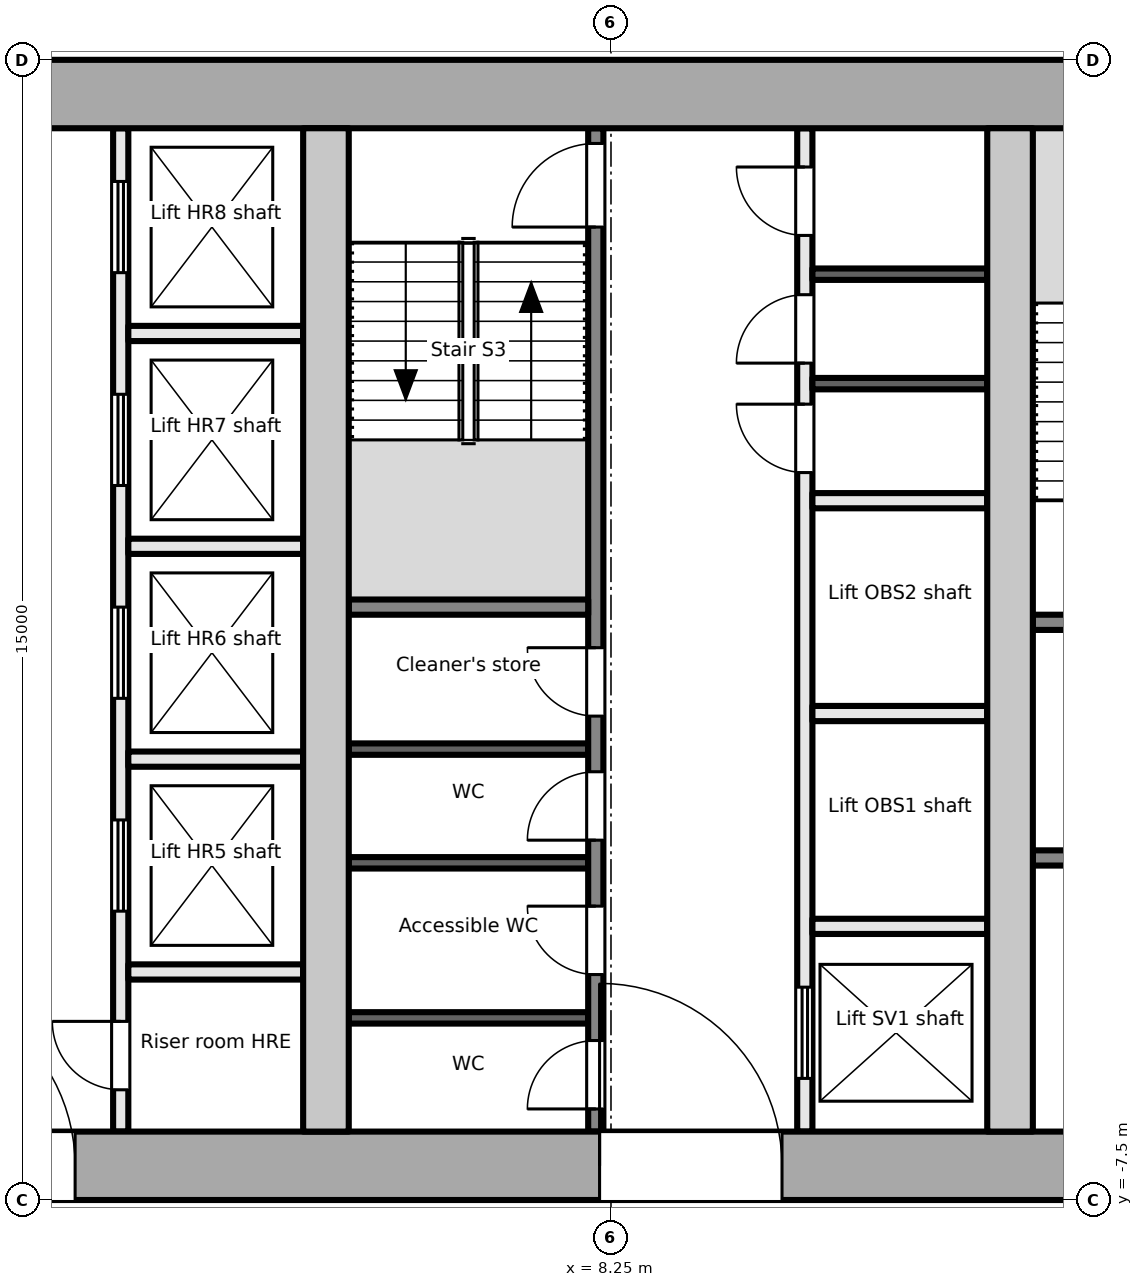
"""IFC4 building model, lengths in metres.
Left out: names, types, materials, properties, quantities, classifications, styles, units other than length and angle.
Written with IfcOpenShell. Run it as: python <this file> out.ifc"""

import sys

from ifc_helpers import new_model, si_unit, direction, frame, frame_2d, origin, place, context, subcontext, project, spatial, rectangle, extrude, element, fill, save


model = new_model("IFC4")
c1 = context("Model", 3, precision=1e-05, world=origin(), true_north=direction((0.0, 1.0)))
c2 = subcontext(c1, "Body", "Model", "MODEL_VIEW")
j1 = project(units=[si_unit("LENGTHUNIT", "METRE"), si_unit("PLANEANGLEUNIT", "RADIAN")], contexts=[c1])
p1 = place(None, origin())
s1 = spatial("IfcSite", under=j1, at=p1, CompositionType="ELEMENT")
p2 = place(p1, origin())
s2 = spatial("IfcBuilding", under=s1, at=p2, CompositionType="ELEMENT")
p3 = place(p2, frame((0.0, 0.0, 270.7)))
s3 = spatial("IfcBuildingStorey", under=s2, at=p3, CompositionType="ELEMENT", Elevation=270.7)
p4 = place(p3, frame((-18.0, -7.05, -0.2), z_axis=(0.0, 0.0, 1.0), x_axis=(1.0, 0.0, 0.0)))
e1 = element("IfcWall", 1, at=p4, inside=s3, PredefinedType="SHEAR", context=c2, shape_type="SweptSolid", body=[
    extrude(rectangle(XDim=36.0, YDim=0.9, at=frame_2d((18.0, 0.0))), origin(), (0.0, 0.0, 1.0), 3.9),
])
p5 = place(p4, frame((11.3, 0.0, 0.2)))
e2 = element("IfcOpeningElement", 2, at=p5, cuts=e1, PredefinedType="OPENING", context=c2, shape_type="SweptSolid", body=[
    extrude(rectangle(XDim=1.8, YDim=2.1, at=frame_2d((0.9, 1.05))), frame((0.0, 0.46, 0.0), z_axis=(0.0, -1.0, 0.0), x_axis=(1.0, 0.0, 0.0)), (0.0, 0.0, 1.0), 0.921),
])
p6 = place(p4, frame((16.8, 0.0, 0.2)))
e3 = element("IfcOpeningElement", 3, at=p6, cuts=e1, PredefinedType="OPENING", context=c2, shape_type="SweptSolid", body=[
    extrude(rectangle(XDim=2.4, YDim=2.1, at=frame_2d((1.2, 1.05))), frame((0.0, 0.46, 0.0), z_axis=(0.0, -1.0, 0.0), x_axis=(1.0, 0.0, 0.0)), (0.0, 0.0, 1.0), 0.921),
])
p7 = place(p4, frame((26.1, 0.0, 0.2)))
e4 = element("IfcOpeningElement", 4, at=p7, cuts=e1, PredefinedType="OPENING", context=c2, shape_type="SweptSolid", body=[
    extrude(rectangle(XDim=2.4, YDim=2.1, at=frame_2d((1.2, 1.05))), frame((0.0, 0.46, 0.0), z_axis=(0.0, -1.0, 0.0), x_axis=(1.0, 0.0, 0.0)), (0.0, 0.0, 1.0), 0.921),
])
p8 = place(p3, frame((-18.0, 7.05, -0.2), z_axis=(0.0, 0.0, 1.0), x_axis=(1.0, 0.0, 0.0)))
e5 = element("IfcWall", 5, at=p8, inside=s3, PredefinedType="SHEAR", context=c2, shape_type="SweptSolid", body=[
    extrude(rectangle(XDim=36.0, YDim=0.9, at=frame_2d((18.0, 0.0))), origin(), (0.0, 0.0, 1.0), 3.9),
])
for number, where, z_axis, x_axis in (
    (6, (4.5, -6.6, -0.2), (0.0, 0.0, 1.0), (0.0, 1.0, 0.0)),
    (7, (13.5, -6.6, -0.2), (0.0, 0.0, 1.0), (0.0, 1.0, 0.0)),
):
    element("IfcWall", number, at=place(p3, frame(where, z_axis=z_axis, x_axis=x_axis)), inside=s3, PredefinedType="SHEAR", context=c2, shape_type="SweptSolid", body=[
        extrude(rectangle(XDim=13.2, YDim=0.6, at=frame_2d((6.6, 0.0))), origin(), (0.0, 0.0, 1.0), 3.9),
    ])
p9 = place(p3, frame((13.8, -3.0, 0.0), z_axis=(0.0, 0.0, 1.0), x_axis=(1.0, 0.0, 0.0)))
e8 = element("IfcWall", 8, at=p9, inside=s3, PredefinedType="PARTITIONING", context=c2, shape_type="SweptSolid", body=[
    extrude(rectangle(XDim=3.3, YDim=0.2, at=frame_2d((1.65, 0.0))), origin(), (0.0, 0.0, 1.0), 3.7),
])
p10 = place(p9, frame((1.1, 0.0, 0.0)))
e9 = element("IfcOpeningElement", 9, at=p10, cuts=e8, PredefinedType="OPENING", context=c2, shape_type="SweptSolid", body=[
    extrude(rectangle(XDim=1.1, YDim=2.1, at=frame_2d((0.55, 1.05))), frame((0.0, 0.111, 0.0), z_axis=(0.0, -1.0, 0.0), x_axis=(1.0, 0.0, 0.0)), (0.0, 0.0, 1.0), 0.221),
])
p11 = place(p3, frame((13.8, 0.1, 0.0), z_axis=(0.0, 0.0, 1.0), x_axis=(1.0, 0.0, 0.0)))
e10 = element("IfcWall", 10, at=p11, inside=s3, PredefinedType="PARTITIONING", context=c2, shape_type="SweptSolid", body=[
    extrude(rectangle(XDim=3.3, YDim=0.2, at=frame_2d((1.65, 0.0))), origin(), (0.0, 0.0, 1.0), 3.7),
])
p12 = place(p11, frame((1.1, 0.0, 0.0)))
e11 = element("IfcOpeningElement", 11, at=p12, cuts=e10, PredefinedType="OPENING", context=c2, shape_type="SweptSolid", body=[
    extrude(rectangle(XDim=1.1, YDim=2.1, at=frame_2d((0.55, 1.05))), frame((0.0, 0.111, 0.0), z_axis=(0.0, -1.0, 0.0), x_axis=(1.0, 0.0, 0.0)), (0.0, 0.0, 1.0), 0.221),
])
p13 = place(p3, frame((1.8, -6.6, 0.0), z_axis=(0.0, 0.0, 1.0), x_axis=(0.0, 1.0, 0.0)))
e12 = element("IfcWall", 12, at=p13, inside=s3, PredefinedType="PARTITIONING", context=c2, shape_type="SweptSolid", body=[
    extrude(rectangle(XDim=13.2, YDim=0.2, at=frame_2d((6.6, 0.0))), origin(), (0.0, 0.0, 1.0), 3.7),
])
p14 = place(p13, frame((0.55, 0.0, 0.0)))
e13 = element("IfcOpeningElement", 13, at=p14, cuts=e12, PredefinedType="OPENING", context=c2, shape_type="SweptSolid", body=[
    extrude(rectangle(XDim=0.9, YDim=2.1, at=frame_2d((0.45, 1.05))), frame((0.0, 0.111, 0.0), z_axis=(0.0, -1.0, 0.0), x_axis=(1.0, 0.0, 0.0)), (0.0, 0.0, 1.0), 0.221),
])
p15 = place(p13, frame((2.9, 0.0, 0.0)))
e14 = element("IfcOpeningElement", 14, at=p15, cuts=e12, PredefinedType="OPENING", context=c2, shape_type="SweptSolid", body=[
    extrude(rectangle(XDim=1.2, YDim=2.1, at=frame_2d((0.6, 1.05))), frame((0.0, 0.111, 0.0), z_axis=(0.0, -1.0, 0.0), x_axis=(1.0, 0.0, 0.0)), (0.0, 0.0, 1.0), 0.221),
])
p16 = place(p13, frame((5.7, 0.0, 0.0)))
e15 = element("IfcOpeningElement", 15, at=p16, cuts=e12, PredefinedType="OPENING", context=c2, shape_type="SweptSolid", body=[
    extrude(rectangle(XDim=1.2, YDim=2.1, at=frame_2d((0.6, 1.05))), frame((0.0, 0.111, 0.0), z_axis=(0.0, -1.0, 0.0), x_axis=(1.0, 0.0, 0.0)), (0.0, 0.0, 1.0), 0.221),
])
p17 = place(p13, frame((8.5, 0.0, 0.0)))
e16 = element("IfcOpeningElement", 16, at=p17, cuts=e12, PredefinedType="OPENING", context=c2, shape_type="SweptSolid", body=[
    extrude(rectangle(XDim=1.2, YDim=2.1, at=frame_2d((0.6, 1.05))), frame((0.0, 0.111, 0.0), z_axis=(0.0, -1.0, 0.0), x_axis=(1.0, 0.0, 0.0)), (0.0, 0.0, 1.0), 0.221),
])
p18 = place(p13, frame((11.3, 0.0, 0.0)))
e17 = element("IfcOpeningElement", 17, at=p18, cuts=e12, PredefinedType="OPENING", context=c2, shape_type="SweptSolid", body=[
    extrude(rectangle(XDim=1.2, YDim=2.1, at=frame_2d((0.6, 1.05))), frame((0.0, 0.111, 0.0), z_axis=(0.0, -1.0, 0.0), x_axis=(1.0, 0.0, 0.0)), (0.0, 0.0, 1.0), 0.221),
])
for number, where, z_axis, x_axis in (
    (18, (1.9, -1.7, 0.0), (0.0, 0.0, 1.0), (1.0, 0.0, 0.0)),
    (19, (1.9, 1.1, 0.0), (0.0, 0.0, 1.0), (1.0, 0.0, 0.0)),
    (20, (1.9, 3.9, 0.0), (0.0, 0.0, 1.0), (1.0, 0.0, 0.0)),
    (21, (1.9, -4.5, 0.0), (0.0, 0.0, 1.0), (1.0, 0.0, 0.0)),
):
    element("IfcWall", number, at=place(p3, frame(where, z_axis=z_axis, x_axis=x_axis)), inside=s3, PredefinedType="PARTITIONING", context=c2, shape_type="SweptSolid", body=[
        extrude(rectangle(XDim=2.3, YDim=0.2, at=frame_2d((1.15, 0.0))), origin(), (0.0, 0.0, 1.0), 3.7),
    ])
p19 = place(p3, frame((8.05, -6.6, 0.0), z_axis=(0.0, 0.0, 1.0), x_axis=(0.0, 1.0, 0.0)))
e22 = element("IfcWall", 22, at=p19, inside=s3, PredefinedType="PARTITIONING", context=c2, shape_type="SweptSolid", body=[
    extrude(rectangle(XDim=13.2, YDim=0.2, at=frame_2d((6.6, 0.0))), origin(), (0.0, 0.0, 1.0), 3.7),
])
p20 = place(p19, frame((0.298, 0.0, 0.0)))
e23 = element("IfcOpeningElement", 23, at=p20, cuts=e22, PredefinedType="OPENING", context=c2, shape_type="SweptSolid", body=[
    extrude(rectangle(XDim=0.9, YDim=2.1, at=frame_2d((0.45, 1.05))), frame((0.0, 0.111, 0.0), z_axis=(0.0, -1.0, 0.0), x_axis=(1.0, 0.0, 0.0)), (0.0, 0.0, 1.0), 0.221),
])
p21 = place(p19, frame((2.066, 0.0, 0.0)))
e24 = element("IfcOpeningElement", 24, at=p21, cuts=e22, PredefinedType="OPENING", context=c2, shape_type="SweptSolid", body=[
    extrude(rectangle(XDim=0.9, YDim=2.1, at=frame_2d((0.45, 1.05))), frame((0.0, 0.111, 0.0), z_axis=(0.0, -1.0, 0.0), x_axis=(1.0, 0.0, 0.0)), (0.0, 0.0, 1.0), 0.221),
])
p22 = place(p19, frame((3.834, 0.0, 0.0)))
e25 = element("IfcOpeningElement", 25, at=p22, cuts=e22, PredefinedType="OPENING", context=c2, shape_type="SweptSolid", body=[
    extrude(rectangle(XDim=0.9, YDim=2.1, at=frame_2d((0.45, 1.05))), frame((0.0, 0.111, 0.0), z_axis=(0.0, -1.0, 0.0), x_axis=(1.0, 0.0, 0.0)), (0.0, 0.0, 1.0), 0.221),
])
p23 = place(p19, frame((5.466, 0.0, 0.0)))
e26 = element("IfcOpeningElement", 26, at=p23, cuts=e22, PredefinedType="OPENING", context=c2, shape_type="SweptSolid", body=[
    extrude(rectangle(XDim=0.9, YDim=2.1, at=frame_2d((0.45, 1.05))), frame((0.0, 0.111, 0.0), z_axis=(0.0, -1.0, 0.0), x_axis=(1.0, 0.0, 0.0)), (0.0, 0.0, 1.0), 0.221),
])
p24 = place(p19, frame((11.9, 0.0, 0.0)))
e27 = element("IfcOpeningElement", 27, at=p24, cuts=e22, PredefinedType="OPENING", context=c2, shape_type="SweptSolid", body=[
    extrude(rectangle(XDim=1.1, YDim=2.1, at=frame_2d((0.55, 1.05))), frame((0.0, 0.111, 0.0), z_axis=(0.0, -1.0, 0.0), x_axis=(1.0, 0.0, 0.0)), (0.0, 0.0, 1.0), 0.221),
])
p25 = place(p3, frame((10.8, -6.6, 0.0), z_axis=(0.0, 0.0, 1.0), x_axis=(0.0, 1.0, 0.0)))
e28 = element("IfcWall", 28, at=p25, inside=s3, PredefinedType="PARTITIONING", context=c2, shape_type="SweptSolid", body=[
    extrude(rectangle(XDim=13.2, YDim=0.2, at=frame_2d((6.6, 0.0))), origin(), (0.0, 0.0, 1.0), 3.7),
])
p26 = place(p25, frame((0.7, 0.0, 0.0)))
e29 = element("IfcOpeningElement", 29, at=p26, cuts=e28, PredefinedType="OPENING", context=c2, shape_type="SweptSolid", body=[
    extrude(rectangle(XDim=1.2, YDim=2.1, at=frame_2d((0.6, 1.05))), frame((0.0, 0.111, 0.0), z_axis=(0.0, -1.0, 0.0), x_axis=(1.0, 0.0, 0.0)), (0.0, 0.0, 1.0), 0.221),
])
p27 = place(p25, frame((8.67, 0.0, 0.0)))
e30 = element("IfcOpeningElement", 30, at=p27, cuts=e28, PredefinedType="OPENING", context=c2, shape_type="SweptSolid", body=[
    extrude(rectangle(XDim=0.9, YDim=2.1, at=frame_2d((0.45, 1.05))), frame((0.0, 0.111, 0.0), z_axis=(0.0, -1.0, 0.0), x_axis=(1.0, 0.0, 0.0)), (0.0, 0.0, 1.0), 0.221),
])
p28 = place(p25, frame((10.11, 0.0, 0.0)))
e31 = element("IfcOpeningElement", 31, at=p28, cuts=e28, PredefinedType="OPENING", context=c2, shape_type="SweptSolid", body=[
    extrude(rectangle(XDim=0.9, YDim=2.1, at=frame_2d((0.45, 1.05))), frame((0.0, 0.111, 0.0), z_axis=(0.0, -1.0, 0.0), x_axis=(1.0, 0.0, 0.0)), (0.0, 0.0, 1.0), 0.221),
])
p29 = place(p25, frame((11.79, 0.0, 0.0)))
e32 = element("IfcOpeningElement", 32, at=p29, cuts=e28, PredefinedType="OPENING", context=c2, shape_type="SweptSolid", body=[
    extrude(rectangle(XDim=0.9, YDim=2.1, at=frame_2d((0.45, 1.05))), frame((0.0, 0.111, 0.0), z_axis=(0.0, -1.0, 0.0), x_axis=(1.0, 0.0, 0.0)), (0.0, 0.0, 1.0), 0.221),
])
p30 = place(p3, frame((4.8, 0.3, 0.0), z_axis=(0.0, 0.0, 1.0), x_axis=(1.0, 0.0, 0.0)))
e33 = element("IfcWall", 33, at=p30, inside=s3, PredefinedType="PARTITIONING", context=c2, shape_type="SweptSolid", body=[
    extrude(rectangle(XDim=3.15, YDim=0.2, at=frame_2d((1.575, 0.0))), origin(), (0.0, 0.0, 1.0), 3.7),
])
for number, where, z_axis, x_axis in (
    (34, (4.8, -5.104, 0.0), (0.0, 0.0, 1.0), (1.0, 0.0, 0.0)),
    (35, (4.8, -3.064, 0.0), (0.0, 0.0, 1.0), (1.0, 0.0, 0.0)),
    (36, (4.8, -1.568, 0.0), (0.0, 0.0, 1.0), (1.0, 0.0, 0.0)),
):
    element("IfcWall", number, at=place(p3, frame(where, z_axis=z_axis, x_axis=x_axis)), inside=s3, PredefinedType="PARTITIONING", context=c2, shape_type="SweptSolid", body=[
        extrude(rectangle(XDim=3.15, YDim=0.15, at=frame_2d((1.575, 0.0))), origin(), (0.0, 0.0, 1.0), 3.7),
    ])
for number, where, z_axis, x_axis in (
    (37, (10.9, -3.9, 0.0), (0.0, 0.0, 1.0), (1.0, 0.0, 0.0)),
    (38, (10.9, -1.1, 0.0), (0.0, 0.0, 1.0), (1.0, 0.0, 0.0)),
    (39, (10.9, 1.7, 0.0), (0.0, 0.0, 1.0), (1.0, 0.0, 0.0)),
):
    element("IfcWall", number, at=place(p3, frame(where, z_axis=z_axis, x_axis=x_axis)), inside=s3, PredefinedType="PARTITIONING", context=c2, shape_type="SweptSolid", body=[
        extrude(rectangle(XDim=2.3, YDim=0.2, at=frame_2d((1.15, 0.0))), origin(), (0.0, 0.0, 1.0), 3.7),
    ])
for number, where, z_axis, x_axis in (
    (40, (10.9, 3.24, 0.0), (0.0, 0.0, 1.0), (1.0, 0.0, 0.0)),
    (41, (10.9, 4.68, 0.0), (0.0, 0.0, 1.0), (1.0, 0.0, 0.0)),
):
    element("IfcWall", number, at=place(p3, frame(where, z_axis=z_axis, x_axis=x_axis)), inside=s3, PredefinedType="PARTITIONING", context=c2, shape_type="SweptSolid", body=[
        extrude(rectangle(XDim=2.3, YDim=0.15, at=frame_2d((1.15, 0.0))), origin(), (0.0, 0.0, 1.0), 3.7),
    ])
p31 = place(p14, origin())
e42 = element("IfcDoor", 42, at=p31, inside=s3, OperationType="SINGLE_SWING_RIGHT", PredefinedType="DOOR", context=c2, shape_type="SweptSolid", body=[
    extrude(rectangle(XDim=0.9, YDim=2.1, at=frame_2d((0.45, 1.05))), frame((0.0, 0.025, 0.0), z_axis=(0.0, -1.0, 0.0), x_axis=(1.0, 0.0, 0.0)), (0.0, 0.0, 1.0), 0.05),
])
fill(e13, e42)
p32 = place(p15, origin())
e43 = element("IfcDoor", 43, at=p32, inside=s3, OperationType="DOUBLE_DOOR_SLIDING", PredefinedType="DOOR", context=c2, shape_type="SweptSolid", body=[
    extrude(rectangle(XDim=1.2, YDim=2.1, at=frame_2d((0.6, 1.05))), frame((0.0, 0.025, 0.0), z_axis=(0.0, -1.0, 0.0), x_axis=(1.0, 0.0, 0.0)), (0.0, 0.0, 1.0), 0.05),
])
fill(e14, e43)
p33 = place(p16, origin())
e44 = element("IfcDoor", 44, at=p33, inside=s3, OperationType="DOUBLE_DOOR_SLIDING", PredefinedType="DOOR", context=c2, shape_type="SweptSolid", body=[
    extrude(rectangle(XDim=1.2, YDim=2.1, at=frame_2d((0.6, 1.05))), frame((0.0, 0.025, 0.0), z_axis=(0.0, -1.0, 0.0), x_axis=(1.0, 0.0, 0.0)), (0.0, 0.0, 1.0), 0.05),
])
fill(e15, e44)
p34 = place(p17, origin())
e45 = element("IfcDoor", 45, at=p34, inside=s3, OperationType="DOUBLE_DOOR_SLIDING", PredefinedType="DOOR", context=c2, shape_type="SweptSolid", body=[
    extrude(rectangle(XDim=1.2, YDim=2.1, at=frame_2d((0.6, 1.05))), frame((0.0, 0.025, 0.0), z_axis=(0.0, -1.0, 0.0), x_axis=(1.0, 0.0, 0.0)), (0.0, 0.0, 1.0), 0.05),
])
fill(e16, e45)
p35 = place(p18, origin())
e46 = element("IfcDoor", 46, at=p35, inside=s3, OperationType="DOUBLE_DOOR_SLIDING", PredefinedType="DOOR", context=c2, shape_type="SweptSolid", body=[
    extrude(rectangle(XDim=1.2, YDim=2.1, at=frame_2d((0.6, 1.05))), frame((0.0, 0.025, 0.0), z_axis=(0.0, -1.0, 0.0), x_axis=(1.0, 0.0, 0.0)), (0.0, 0.0, 1.0), 0.05),
])
fill(e17, e46)
p36 = place(p6, origin())
e47 = element("IfcDoor", 47, at=p36, inside=s3, OperationType="DOUBLE_DOOR_DOUBLE_SWING", PredefinedType="DOOR", context=c2, shape_type="SweptSolid", body=[
    extrude(rectangle(XDim=2.4, YDim=2.1, at=frame_2d((1.2, 1.05))), frame((0.0, 0.025, 0.0), z_axis=(0.0, -1.0, 0.0), x_axis=(1.0, 0.0, 0.0)), (0.0, 0.0, 1.0), 0.05),
])
fill(e3, e47)
p37 = place(p20, origin())
e48 = element("IfcDoor", 48, at=p37, inside=s3, OperationType="SINGLE_SWING_LEFT", PredefinedType="DOOR", context=c2, shape_type="SweptSolid", body=[
    extrude(rectangle(XDim=0.9, YDim=2.1, at=frame_2d((0.45, 1.05))), frame((0.0, 0.025, 0.0), z_axis=(0.0, -1.0, 0.0), x_axis=(1.0, 0.0, 0.0)), (0.0, 0.0, 1.0), 0.05),
])
fill(e23, e48)
p38 = place(p21, origin())
e49 = element("IfcDoor", 49, at=p38, inside=s3, OperationType="SINGLE_SWING_RIGHT", PredefinedType="DOOR", context=c2, shape_type="SweptSolid", body=[
    extrude(rectangle(XDim=0.9, YDim=2.1, at=frame_2d((0.45, 1.05))), frame((0.0, 0.025, 0.0), z_axis=(0.0, -1.0, 0.0), x_axis=(1.0, 0.0, 0.0)), (0.0, 0.0, 1.0), 0.05),
])
fill(e24, e49)
p39 = place(p22, origin())
e50 = element("IfcDoor", 50, at=p39, inside=s3, OperationType="SINGLE_SWING_LEFT", PredefinedType="DOOR", context=c2, shape_type="SweptSolid", body=[
    extrude(rectangle(XDim=0.9, YDim=2.1, at=frame_2d((0.45, 1.05))), frame((0.0, 0.025, 0.0), z_axis=(0.0, -1.0, 0.0), x_axis=(1.0, 0.0, 0.0)), (0.0, 0.0, 1.0), 0.05),
])
fill(e25, e50)
p40 = place(p23, origin())
e51 = element("IfcDoor", 51, at=p40, inside=s3, OperationType="SINGLE_SWING_RIGHT", PredefinedType="DOOR", context=c2, shape_type="SweptSolid", body=[
    extrude(rectangle(XDim=0.9, YDim=2.1, at=frame_2d((0.45, 1.05))), frame((0.0, 0.025, 0.0), z_axis=(0.0, -1.0, 0.0), x_axis=(1.0, 0.0, 0.0)), (0.0, 0.0, 1.0), 0.05),
])
fill(e26, e51)
p41 = place(p24, origin())
e52 = element("IfcDoor", 52, at=p41, inside=s3, OperationType="SINGLE_SWING_LEFT", PredefinedType="DOOR", context=c2, shape_type="SweptSolid", body=[
    extrude(rectangle(XDim=1.1, YDim=2.1, at=frame_2d((0.55, 1.05))), frame((0.0, 0.025, 0.0), z_axis=(0.0, -1.0, 0.0), x_axis=(1.0, 0.0, 0.0)), (0.0, 0.0, 1.0), 0.05),
])
fill(e27, e52)
p42 = place(p7, origin())
e53 = element("IfcDoor", 53, at=p42, inside=s3, OperationType="DOUBLE_DOOR_DOUBLE_SWING", PredefinedType="DOOR", context=c2, shape_type="SweptSolid", body=[
    extrude(rectangle(XDim=2.4, YDim=2.1, at=frame_2d((1.2, 1.05))), frame((0.0, 0.025, 0.0), z_axis=(0.0, -1.0, 0.0), x_axis=(1.0, 0.0, 0.0)), (0.0, 0.0, 1.0), 0.05),
])
fill(e4, e53)
p43 = place(p26, origin())
e54 = element("IfcDoor", 54, at=p43, inside=s3, OperationType="DOUBLE_DOOR_SLIDING", PredefinedType="DOOR", context=c2, shape_type="SweptSolid", body=[
    extrude(rectangle(XDim=1.2, YDim=2.1, at=frame_2d((0.6, 1.05))), frame((0.0, 0.025, 0.0), z_axis=(0.0, -1.0, 0.0), x_axis=(1.0, 0.0, 0.0)), (0.0, 0.0, 1.0), 0.05),
])
fill(e29, e54)
p44 = place(p27, origin())
e55 = element("IfcDoor", 55, at=p44, inside=s3, OperationType="SINGLE_SWING_RIGHT", PredefinedType="DOOR", context=c2, shape_type="SweptSolid", body=[
    extrude(rectangle(XDim=0.9, YDim=2.1, at=frame_2d((0.45, 1.05))), frame((0.0, 0.025, 0.0), z_axis=(0.0, -1.0, 0.0), x_axis=(1.0, 0.0, 0.0)), (0.0, 0.0, 1.0), 0.05),
])
fill(e30, e55)
p45 = place(p28, origin())
e56 = element("IfcDoor", 56, at=p45, inside=s3, OperationType="SINGLE_SWING_LEFT", PredefinedType="DOOR", context=c2, shape_type="SweptSolid", body=[
    extrude(rectangle(XDim=0.9, YDim=2.1, at=frame_2d((0.45, 1.05))), frame((0.0, 0.025, 0.0), z_axis=(0.0, -1.0, 0.0), x_axis=(1.0, 0.0, 0.0)), (0.0, 0.0, 1.0), 0.05),
])
fill(e31, e56)
p46 = place(p29, origin())
e57 = element("IfcDoor", 57, at=p46, inside=s3, OperationType="SINGLE_SWING_RIGHT", PredefinedType="DOOR", context=c2, shape_type="SweptSolid", body=[
    extrude(rectangle(XDim=0.9, YDim=2.1, at=frame_2d((0.45, 1.05))), frame((0.0, 0.025, 0.0), z_axis=(0.0, -1.0, 0.0), x_axis=(1.0, 0.0, 0.0)), (0.0, 0.0, 1.0), 0.05),
])
fill(e32, e57)
save(model, sys.argv[1])
